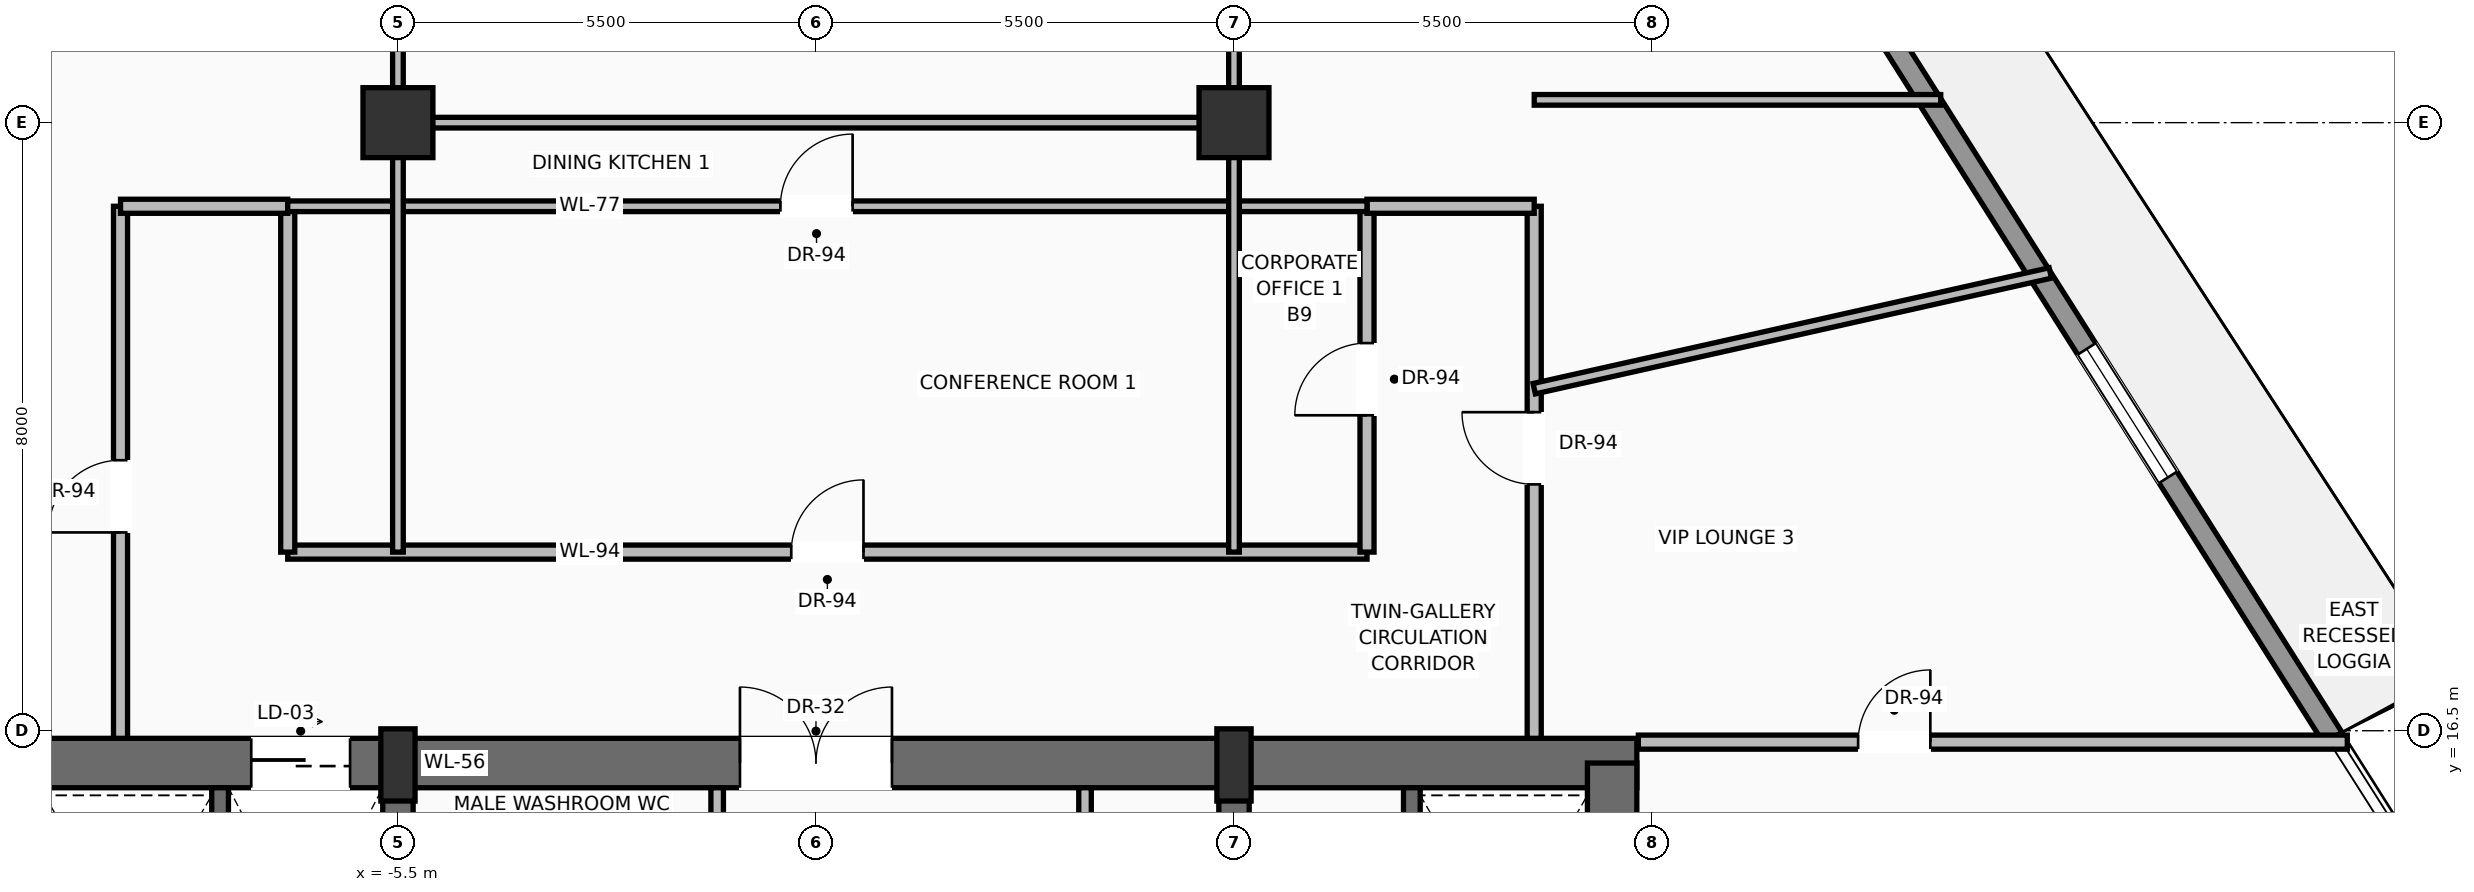
"""IFC4 building model, lengths in metres.
Left out: names, types, materials, properties, quantities, classifications, styles, units other than length and angle.
Written with IfcOpenShell. Run it as: python <this file> out.ifc"""

import sys

from ifc_helpers import new_model, si_unit, direction, frame, frame_2d, origin, origin_2d, place, context, subcontext, project, spatial, rectangle, extrude, source, transform, mapped, element, fill, save


model = new_model("IFC4")
c1 = context("Model", 3, precision=1e-05, world=origin(), true_north=direction((0.0, 1.0)))
c2 = subcontext(c1, "Body", "Model", "MODEL_VIEW")
j1 = project(units=[si_unit("LENGTHUNIT", "METRE"), si_unit("PLANEANGLEUNIT", "RADIAN")], contexts=[c1])
p1 = place(None, origin())
s1 = spatial("IfcSite", under=j1, at=p1, CompositionType="ELEMENT")
p2 = place(p1, origin())
s2 = spatial("IfcBuilding", under=s1, at=p2, CompositionType="ELEMENT")
p3 = place(p2, frame((0.0, 0.0, 189.5)))
s3 = spatial("IfcBuildingStorey", under=s2, at=p3, CompositionType="ELEMENT", Elevation=189.5)
p4 = place(p3, frame((-10.8, 16.075, 0.0), z_axis=(0.0, 0.0, 1.0), x_axis=(1.0, 0.0, 0.0)))
e1 = element("IfcWall", 1, at=p4, inside=s3, PredefinedType="SHEAR", context=c2, shape_type="SweptSolid", body=[
    extrude(rectangle(XDim=21.6, YDim=0.65, at=frame_2d((10.8, 0.0))), origin(), (0.0, 0.0, 1.0), 3.47),
])
p5 = place(p4, frame((3.37, 0.0, 0.0)))
e2 = element("IfcOpeningElement", 2, at=p5, cuts=e1, PredefinedType="OPENING", context=c2, shape_type="SweptSolid", body=[
    extrude(rectangle(XDim=1.3, YDim=2.3, at=frame_2d((0.65, 1.15))), frame((0.0, 0.335, 0.0), z_axis=(0.0, -1.0, 0.0), x_axis=(1.0, 0.0, 0.0)), (0.0, 0.0, 1.0), 0.67),
])
p6 = place(p4, frame((9.8, 0.0, 0.0)))
e3 = element("IfcOpeningElement", 3, at=p6, cuts=e1, PredefinedType="OPENING", context=c2, shape_type="SweptSolid", body=[
    extrude(rectangle(XDim=2.0, YDim=2.4, at=frame_2d((1.0, 1.2))), frame((0.0, 0.335, 0.0), z_axis=(0.0, -1.0, 0.0), x_axis=(1.0, 0.0, 0.0)), (0.0, 0.0, 1.0), 0.67),
])
p7 = place(p3, frame((10.475, 0.525, 0.0), z_axis=(0.0, 0.0, 1.0), x_axis=(0.0, 1.0, 0.0)))
e4 = element("IfcWall", 4, at=p7, inside=s3, PredefinedType="SHEAR", context=c2, shape_type="SweptSolid", body=[
    extrude(rectangle(XDim=15.55, YDim=0.65, at=frame_2d((7.775, 0.0))), origin(), (0.0, 0.0, 1.0), 3.47),
])
p8 = place(p3, frame((-5.5, 0.525, 0.0), z_axis=(0.0, 0.0, 1.0), x_axis=(0.0, 1.0, 0.0)))
e5 = element("IfcWall", 5, at=p8, inside=s3, PredefinedType="SHEAR", context=c2, shape_type="SweptSolid", body=[
    extrude(rectangle(XDim=15.55, YDim=0.4, at=frame_2d((7.775, 0.0))), origin(), (0.0, 0.0, 1.0), 3.47),
])
p9 = place(p8, frame((8.975, 0.0, 0.0)))
e6 = element("IfcOpeningElement", 6, at=p9, cuts=e5, PredefinedType="OPENING", context=c2, shape_type="SweptSolid", body=[
    extrude(rectangle(XDim=1.1, YDim=2.2, at=frame_2d((0.55, 1.1))), frame((0.0, 0.21, 0.0), z_axis=(0.0, -1.0, 0.0), x_axis=(1.0, 0.0, 0.0)), (0.0, 0.0, 1.0), 0.42),
])
p10 = place(p3, frame((5.5, 0.525, 0.0), z_axis=(0.0, 0.0, 1.0), x_axis=(0.0, 1.0, 0.0)))
e7 = element("IfcWall", 7, at=p10, inside=s3, PredefinedType="SHEAR", context=c2, shape_type="SweptSolid", body=[
    extrude(rectangle(XDim=15.55, YDim=0.4, at=frame_2d((7.775, 0.0))), origin(), (0.0, 0.0, 1.0), 3.47),
])
p11 = place(p10, frame((8.975, 0.0, 0.0)))
e8 = element("IfcOpeningElement", 8, at=p11, cuts=e7, PredefinedType="OPENING", context=c2, shape_type="SweptSolid", body=[
    extrude(rectangle(XDim=1.1, YDim=2.2, at=frame_2d((0.55, 1.1))), frame((0.0, 0.21, 0.0), z_axis=(0.0, -1.0, 0.0), x_axis=(1.0, 0.0, 0.0)), (0.0, 0.0, 1.0), 0.42),
])
m1 = source(origin(), c2, "Body", "SweptSolid", [
    extrude(rectangle(XDim=0.45, YDim=0.95, at=origin_2d()), origin(), (0.0, 0.0, 1.0), 3.7),
])
for number, where, z_axis, x_axis in (
    (9, (-5.5, 16.05, 0.0), (0.0, 0.0, 1.0), (1.0, 0.0, 0.0)),
    (10, (5.5, 16.05, 0.0), (0.0, 0.0, 1.0), (1.0, 0.0, 0.0)),
):
    element("IfcColumn", number, at=place(p3, frame(where, z_axis=z_axis, x_axis=x_axis)), inside=s3, PredefinedType="PILASTER", context=c2, shape_type="MappedRepresentation", body=[
        mapped(m1, transform((0.0, 0.0, 0.0), scale=1.0)),
    ])
m2 = source(origin(), c2, "Body", "SweptSolid", [
    extrude(rectangle(XDim=0.92, YDim=0.92, at=origin_2d()), origin(), (0.0, 0.0, 1.0), 3.7),
])
for number, where, z_axis, x_axis in (
    (11, (-5.5, 24.5, 0.0), (0.0, 0.0, 1.0), (1.0, 0.0, 0.0)),
    (12, (5.5, 24.5, 0.0), (0.0, 0.0, 1.0), (1.0, 0.0, 0.0)),
):
    element("IfcColumn", number, at=place(p3, frame(where, z_axis=z_axis, x_axis=x_axis)), inside=s3, PredefinedType="COLUMN", context=c2, shape_type="MappedRepresentation", body=[
        mapped(m2, transform((0.0, 0.0, 0.0), scale=1.0)),
    ])
p12 = place(p3, frame((9.833, 32.401, 0.0), z_axis=(0.0, 0.0, 1.0), x_axis=(0.534873816305, -0.844931950296, 0.0)))
e13 = element("IfcWall", 13, at=p12, inside=s3, PredefinedType="SOLIDWALL", context=c2, shape_type="SweptSolid", body=[
    extrude(rectangle(XDim=18.932, YDim=0.28, at=frame_2d((9.466, 0.0))), origin(), (0.0, 0.0, 1.0), 3.05),
])
p13 = place(p12, frame((4.544, 0.0, 0.0)))
e14 = element("IfcOpeningElement", 14, at=p13, cuts=e13, PredefinedType="OPENING", context=c2, shape_type="SweptSolid", body=[
    extrude(rectangle(XDim=1.6, YDim=2.35, at=frame_2d((0.8, 1.175))), frame((0.0, 0.15, 0.0), z_axis=(0.0, -1.0, 0.0), x_axis=(1.0, 0.0, 0.0)), (0.0, 0.0, 1.0), 0.3),
])
p14 = place(p12, frame((12.874, 0.0, 0.9)))
e15 = element("IfcOpeningElement", 15, at=p14, cuts=e13, PredefinedType="OPENING", context=c2, shape_type="SweptSolid", body=[
    extrude(rectangle(XDim=2.0, YDim=1.85, at=frame_2d((1.0, 0.925))), frame((0.0, 0.15, 0.0), z_axis=(0.0, -1.0, 0.0), x_axis=(1.0, 0.0, 0.0)), (0.0, 0.0, 1.0), 0.3),
])
for number, where, z_axis, x_axis in (
    (16, (-7.84, 11.87, 0.0), (0.0, 0.0, 1.0), (0.0, 1.0, 0.0)),
    (17, (7.84, 11.87, 0.0), (0.0, 0.0, 1.0), (0.0, 1.0, 0.0)),
):
    element("IfcWall", number, at=place(p3, frame(where, z_axis=z_axis, x_axis=x_axis)), inside=s3, PredefinedType="SOLIDWALL", context=c2, shape_type="SweptSolid", body=[
        extrude(rectangle(XDim=3.88, YDim=0.22, at=frame_2d((1.94, 0.0))), origin(), (0.0, 0.0, 1.0), 3.47),
    ])
p15 = place(p3, frame((-1.3, 13.6, 0.0), z_axis=(0.0, 0.0, 1.0), x_axis=(0.0, 1.0, 0.0)))
e18 = element("IfcWall", 18, at=p15, inside=s3, PredefinedType="PARTITIONING", context=c2, shape_type="SweptSolid", body=[
    extrude(rectangle(XDim=2.15, YDim=0.165, at=frame_2d((1.075, 0.0))), origin(), (0.0, 0.0, 1.0), 3.462),
])
p16 = place(p15, frame((0.55, 0.0, 0.0)))
e19 = element("IfcOpeningElement", 19, at=p16, cuts=e18, PredefinedType="OPENING", context=c2, shape_type="SweptSolid", body=[
    extrude(rectangle(XDim=0.9, YDim=2.1, at=frame_2d((0.45, 1.05))), frame((0.0, 0.093, 0.0), z_axis=(0.0, -1.0, 0.0), x_axis=(1.0, 0.0, 0.0)), (0.0, 0.0, 1.0), 0.185),
])
p17 = place(p3, frame((3.54, 11.22, 0.0), z_axis=(0.0, 0.0, 1.0), x_axis=(0.0, 1.0, 0.0)))
e20 = element("IfcWall", 20, at=p17, inside=s3, PredefinedType="PARTITIONING", context=c2, shape_type="SweptSolid", body=[
    extrude(rectangle(XDim=4.53, YDim=0.165, at=frame_2d((2.265, 0.0))), origin(), (0.0, 0.0, 1.0), 3.462),
])
p18 = place(p17, frame((1.25, 0.0, 0.0)))
e21 = element("IfcOpeningElement", 21, at=p18, cuts=e20, PredefinedType="OPENING", context=c2, shape_type="SweptSolid", body=[
    extrude(rectangle(XDim=0.9, YDim=2.1, at=frame_2d((0.45, 1.05))), frame((0.0, 0.093, 0.0), z_axis=(0.0, -1.0, 0.0), x_axis=(1.0, 0.0, 0.0)), (0.0, 0.0, 1.0), 0.185),
])
p19 = place(p3, frame((-6.95, 18.85, 0.0), z_axis=(0.0, 0.0, 1.0), x_axis=(1.0, 0.0, 0.0)))
e22 = element("IfcWall", 22, at=p19, inside=s3, PredefinedType="PARTITIONING", context=c2, shape_type="SweptSolid", body=[
    extrude(rectangle(XDim=14.2, YDim=0.185, at=frame_2d((7.1, 0.0))), origin(), (0.0, 0.0, 1.0), 2.846),
])
p20 = place(p19, frame((6.625, 0.0, 0.0)))
e23 = element("IfcOpeningElement", 23, at=p20, cuts=e22, PredefinedType="OPENING", context=c2, shape_type="SweptSolid", body=[
    extrude(rectangle(XDim=0.95, YDim=2.2, at=frame_2d((0.475, 1.1))), frame((0.0, 0.103, 0.0), z_axis=(0.0, -1.0, 0.0), x_axis=(1.0, 0.0, 0.0)), (0.0, 0.0, 1.0), 0.205),
])
p21 = place(p3, frame((-6.95, 18.85, 0.0), z_axis=(0.0, 0.0, 1.0), x_axis=(0.0, 1.0, 0.0)))
e24 = element("IfcWall", 24, at=p21, inside=s3, PredefinedType="PARTITIONING", context=c2, shape_type="SweptSolid", body=[
    extrude(rectangle(XDim=4.55, YDim=0.185, at=frame_2d((2.275, 0.0))), origin(), (0.0, 0.0, 1.0), 3.462),
])
p22 = place(p3, frame((7.25, 18.85, 0.0), z_axis=(0.0, 0.0, 1.0), x_axis=(0.0, 1.0, 0.0)))
e25 = element("IfcWall", 25, at=p22, inside=s3, PredefinedType="PARTITIONING", context=c2, shape_type="SweptSolid", body=[
    extrude(rectangle(XDim=4.55, YDim=0.185, at=frame_2d((2.275, 0.0))), origin(), (0.0, 0.0, 1.0), 3.462),
])
p23 = place(p22, frame((1.8, 0.0, 0.0)))
e26 = element("IfcOpeningElement", 26, at=p23, cuts=e25, PredefinedType="OPENING", context=c2, shape_type="SweptSolid", body=[
    extrude(rectangle(XDim=0.95, YDim=2.2, at=frame_2d((0.475, 1.1))), frame((0.0, 0.103, 0.0), z_axis=(0.0, -1.0, 0.0), x_axis=(1.0, 0.0, 0.0)), (0.0, 0.0, 1.0), 0.205),
])
p24 = place(p3, frame((-9.15, 16.4, 0.0), z_axis=(0.0, 0.0, 1.0), x_axis=(0.0, 1.0, 0.0)))
e27 = element("IfcWall", 27, at=p24, inside=s3, PredefinedType="PARTITIONING", context=c2, shape_type="SweptSolid", body=[
    extrude(rectangle(XDim=7.0, YDim=0.185, at=frame_2d((3.5, 0.0))), origin(), (0.0, 0.0, 1.0), 3.462),
])
p25 = place(p24, frame((2.709, 0.0, 0.0)))
e28 = element("IfcOpeningElement", 28, at=p25, cuts=e27, PredefinedType="OPENING", context=c2, shape_type="SweptSolid", body=[
    extrude(rectangle(XDim=0.95, YDim=2.2, at=frame_2d((0.475, 1.1))), frame((0.0, 0.103, 0.0), z_axis=(0.0, -1.0, 0.0), x_axis=(1.0, 0.0, 0.0)), (0.0, 0.0, 1.0), 0.205),
])
p26 = place(p3, frame((9.45, 16.4, 0.0), z_axis=(0.0, 0.0, 1.0), x_axis=(0.0, 1.0, 0.0)))
e29 = element("IfcWall", 29, at=p26, inside=s3, PredefinedType="PARTITIONING", context=c2, shape_type="SweptSolid", body=[
    extrude(rectangle(XDim=7.0, YDim=0.185, at=frame_2d((3.5, 0.0))), origin(), (0.0, 0.0, 1.0), 3.462),
])
p27 = place(p26, frame((3.341, 0.0, 0.0)))
e30 = element("IfcOpeningElement", 30, at=p27, cuts=e29, PredefinedType="OPENING", context=c2, shape_type="SweptSolid", body=[
    extrude(rectangle(XDim=0.95, YDim=2.2, at=frame_2d((0.475, 1.1))), frame((0.0, 0.103, 0.0), z_axis=(0.0, -1.0, 0.0), x_axis=(1.0, 0.0, 0.0)), (0.0, 0.0, 1.0), 0.205),
])
for number, where, z_axis, x_axis in (
    (31, (-9.15, 23.4, 0.0), (0.0, 0.0, 1.0), (1.0, 0.0, 0.0)),
    (32, (7.25, 23.4, 0.0), (0.0, 0.0, 1.0), (1.0, 0.0, 0.0)),
):
    element("IfcWall", number, at=place(p3, frame(where, z_axis=z_axis, x_axis=x_axis)), inside=s3, PredefinedType="PARTITIONING", context=c2, shape_type="SweptSolid", body=[
        extrude(rectangle(XDim=2.2, YDim=0.185, at=frame_2d((1.1, 0.0))), origin(), (0.0, 0.0, 1.0), 3.462),
    ])
p28 = place(p3, frame((10.82, 16.35, 0.0), z_axis=(0.0, 0.0, 1.0), x_axis=(1.0, 0.0, 0.0)))
e33 = element("IfcWall", 33, at=p28, inside=s3, PredefinedType="PARTITIONING", context=c2, shape_type="SweptSolid", body=[
    extrude(rectangle(XDim=9.328, YDim=0.185, at=frame_2d((4.664, 0.0))), origin(), (0.0, 0.0, 1.0), 3.462),
])
p29 = place(p28, frame((2.892, 0.0, 0.0)))
e34 = element("IfcOpeningElement", 34, at=p29, cuts=e33, PredefinedType="OPENING", context=c2, shape_type="SweptSolid", body=[
    extrude(rectangle(XDim=0.95, YDim=2.2, at=frame_2d((0.475, 1.1))), frame((0.0, 0.103, 0.0), z_axis=(0.0, -1.0, 0.0), x_axis=(1.0, 0.0, 0.0)), (0.0, 0.0, 1.0), 0.205),
])
p30 = place(p3, frame((-6.95, 23.4, 0.0), z_axis=(0.0, 0.0, 1.0), x_axis=(1.0, 0.0, 0.0)))
e35 = element("IfcWall", 35, at=p30, inside=s3, PredefinedType="PARTITIONING", context=c2, shape_type="SweptSolid", body=[
    extrude(rectangle(XDim=14.2, YDim=0.14, at=frame_2d((7.1, 0.0))), origin(), (0.0, 0.0, 1.0), 3.462),
])
p31 = place(p30, frame((6.482, 0.0, 0.0)))
e36 = element("IfcOpeningElement", 36, at=p31, cuts=e35, PredefinedType="OPENING", context=c2, shape_type="SweptSolid", body=[
    extrude(rectangle(XDim=0.95, YDim=2.2, at=frame_2d((0.475, 1.1))), frame((0.0, 0.08, 0.0), z_axis=(0.0, -1.0, 0.0), x_axis=(1.0, 0.0, 0.0)), (0.0, 0.0, 1.0), 0.16),
])
for number, where, z_axis, x_axis in (
    (37, (-5.5, 18.85, 0.0), (0.0, 0.0, 1.0), (0.0, 1.0, 0.0)),
    (38, (5.5, 18.85, 0.0), (0.0, 0.0, 1.0), (0.0, 1.0, 0.0)),
):
    element("IfcWall", number, at=place(p3, frame(where, z_axis=z_axis, x_axis=x_axis)), inside=s3, PredefinedType="PARTITIONING", context=c2, shape_type="SweptSolid", body=[
        extrude(rectangle(XDim=13.65, YDim=0.14, at=frame_2d((6.825, 0.0))), origin(), (0.0, 0.0, 1.0), 2.846),
    ])
p32 = place(p3, frame((-5.5, 24.5, 0.0), z_axis=(0.0, 0.0, 1.0), x_axis=(1.0, 0.0, 0.0)))
e39 = element("IfcWall", 39, at=p32, inside=s3, PredefinedType="PARTITIONING", context=c2, shape_type="SweptSolid", body=[
    extrude(rectangle(XDim=11.0, YDim=0.14, at=frame_2d((5.5, 0.0))), origin(), (0.0, 0.0, 1.0), 2.846),
])
p33 = place(p3, frame((9.45, 21.0, 0.0), z_axis=(0.0, 0.0, 1.0), x_axis=(0.975775891763, 0.21877250525, 0.0)))
e40 = element("IfcWall", 40, at=p33, inside=s3, PredefinedType="PARTITIONING", context=c2, shape_type="SweptSolid", body=[
    extrude(rectangle(XDim=6.959, YDim=0.14, at=frame_2d((3.479, 0.0))), origin(), (0.0, 0.0, 1.0), 3.049),
])
p34 = place(p3, frame((9.45, 24.8, 0.0), z_axis=(0.0, 0.0, 1.0), x_axis=(1.0, 0.0, 0.0)))
e41 = element("IfcWall", 41, at=p34, inside=s3, PredefinedType="PARTITIONING", context=c2, shape_type="SweptSolid", body=[
    extrude(rectangle(XDim=5.349, YDim=0.14, at=frame_2d((2.674, 0.0))), origin(), (0.0, 0.0, 1.0), 3.462),
])
m3 = source(origin(), c2, "Body", "SweptSolid", [
    extrude(rectangle(XDim=2.0, YDim=1.85, at=frame_2d((1.0, 0.925))), frame((0.0, 0.03, 0.0), z_axis=(0.0, -1.0, 0.0), x_axis=(1.0, 0.0, 0.0)), (0.0, 0.0, 1.0), 0.06),
])
p35 = place(p14, origin())
e42 = element("IfcWindow", 42, at=p35, inside=s3, PartitioningType="SINGLE_PANEL", PredefinedType="WINDOW", context=c2, shape_type="MappedRepresentation", body=[
    mapped(m3, transform((0.0, 0.0, 0.0), scale=1.0)),
])
fill(e15, e42)
m4 = source(origin(), c2, "Body", "SweptSolid", [
    extrude(rectangle(XDim=1.3, YDim=2.3, at=frame_2d((0.65, 1.15))), frame((0.0, 0.025, 0.0), z_axis=(0.0, -1.0, 0.0), x_axis=(1.0, 0.0, 0.0)), (0.0, 0.0, 1.0), 0.05),
])
p36 = place(p5, origin())
e43 = element("IfcDoor", 43, at=p36, inside=s3, OperationType="SLIDING_TO_RIGHT", PredefinedType="DOOR", context=c2, shape_type="MappedRepresentation", body=[
    mapped(m4, transform((0.0, 0.0, 0.0), scale=1.0)),
])
fill(e2, e43)
m5 = source(origin(), c2, "Body", "SweptSolid", [
    extrude(rectangle(XDim=2.0, YDim=2.4, at=frame_2d((1.0, 1.2))), frame((0.0, 0.025, 0.0), z_axis=(0.0, -1.0, 0.0), x_axis=(1.0, 0.0, 0.0)), (0.0, 0.0, 1.0), 0.05),
])
p37 = place(p6, origin())
e44 = element("IfcDoor", 44, at=p37, inside=s3, OperationType="DOUBLE_DOOR_SINGLE_SWING", PredefinedType="DOOR", context=c2, shape_type="MappedRepresentation", body=[
    mapped(m5, transform((0.0, 0.0, 0.0), scale=1.0)),
])
fill(e3, e44)
m6 = source(origin(), c2, "Body", "SweptSolid", [
    extrude(rectangle(XDim=0.95, YDim=2.2, at=frame_2d((0.475, 1.1))), frame((0.0, 0.025, 0.0), z_axis=(0.0, -1.0, 0.0), x_axis=(1.0, 0.0, 0.0)), (0.0, 0.0, 1.0), 0.05),
])
p38 = place(p20, origin())
e45 = element("IfcDoor", 45, at=p38, inside=s3, OperationType="SINGLE_SWING_RIGHT", PredefinedType="DOOR", context=c2, shape_type="MappedRepresentation", body=[
    mapped(m6, transform((0.0, 0.0, 0.0), scale=1.0)),
])
fill(e23, e45)
p39 = place(p25, origin())
e46 = element("IfcDoor", 46, at=p39, inside=s3, OperationType="SINGLE_SWING_LEFT", PredefinedType="DOOR", context=c2, shape_type="MappedRepresentation", body=[
    mapped(m6, transform((0.0, 0.0, 0.0), scale=1.0)),
])
fill(e28, e46)
p40 = place(p27, origin())
e47 = element("IfcDoor", 47, at=p40, inside=s3, OperationType="SINGLE_SWING_RIGHT", PredefinedType="DOOR", context=c2, shape_type="MappedRepresentation", body=[
    mapped(m6, transform((0.0, 0.0, 0.0), scale=1.0)),
])
fill(e30, e47)
p41 = place(p29, origin())
e48 = element("IfcDoor", 48, at=p41, inside=s3, OperationType="SINGLE_SWING_RIGHT", PredefinedType="DOOR", context=c2, shape_type="MappedRepresentation", body=[
    mapped(m6, transform((0.0, 0.0, 0.0), scale=1.0)),
])
fill(e34, e48)
p42 = place(p23, origin())
e49 = element("IfcDoor", 49, at=p42, inside=s3, OperationType="SINGLE_SWING_LEFT", PredefinedType="DOOR", context=c2, shape_type="MappedRepresentation", body=[
    mapped(m6, transform((0.0, 0.0, 0.0), scale=1.0)),
])
fill(e26, e49)
p43 = place(p31, origin())
e50 = element("IfcDoor", 50, at=p43, inside=s3, OperationType="SINGLE_SWING_RIGHT", PredefinedType="DOOR", context=c2, shape_type="MappedRepresentation", body=[
    mapped(m6, transform((0.0, 0.0, 0.0), scale=1.0)),
])
fill(e36, e50)
save(model, sys.argv[1])
